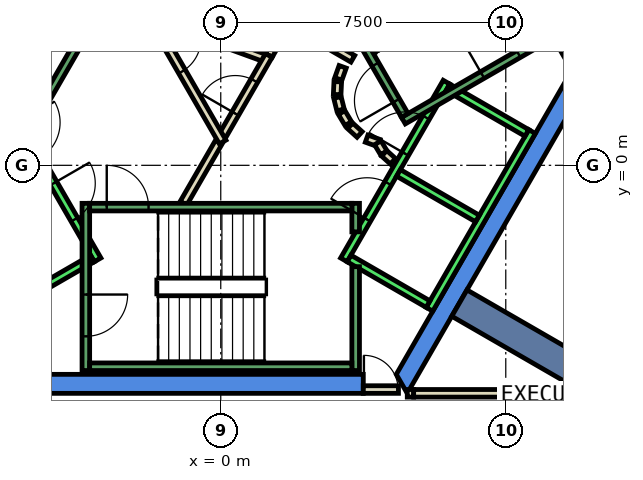
"""IFC4 building model, lengths in metres.
Left out: names, types, materials, properties, quantities, classifications, styles, units other than length and angle.
Written with IfcOpenShell. Run it as: python <this file> out.ifc"""

import sys

from ifc_helpers import new_model, si_unit, direction, frame, frame_2d, origin, place, context, subcontext, project, spatial, polyline, rectangle, outline, extrude, element, fill, save


model = new_model("IFC4")
c1 = context("Model", 3, precision=1e-05, world=origin(), true_north=direction((0.0, 1.0)))
c2 = subcontext(c1, "Body", "Model", "MODEL_VIEW")
j1 = project(units=[si_unit("LENGTHUNIT", "METRE"), si_unit("PLANEANGLEUNIT", "RADIAN")], contexts=[c1])
p1 = place(None, origin())
s1 = spatial("IfcSite", under=j1, at=p1, CompositionType="ELEMENT")
p2 = place(p1, origin())
s2 = spatial("IfcBuilding", under=s1, at=p2, CompositionType="ELEMENT")
p3 = place(p2, frame((0.0, 0.0, 286.4)))
s3 = spatial("IfcBuildingStorey", under=s2, at=p3, CompositionType="ELEMENT", Elevation=286.4)
p4 = place(p3, frame((0.0, 0.0, -0.6)))
e1 = element("IfcWall", 1, at=p4, inside=s3, PredefinedType="SHEAR", context=c2, shape_type="SweptSolid", body=[
    extrude(outline(polyline([(5.486, 9.998), (5.053, 9.748), (9.238, 2.5), (9.815, 2.5), (5.486, 9.998)])), origin(), (0.0, 0.0, 1.0), 3.86),
])
p5 = place(p3, frame((0.0, 0.0, -0.6)))
e2 = element("IfcWall", 2, at=p5, inside=s3, PredefinedType="SHEAR", context=c2, shape_type="SweptSolid", body=[
    extrude(outline(polyline([(3.75, -6.0), (3.75, -5.5), (-4.619, -5.5), (-4.907, -6.0), (3.75, -6.0)])), origin(), (0.0, 0.0, 1.0), 3.86),
])
p6 = place(p3, frame((0.0, 0.0, -0.6)))
e3 = element("IfcWall", 3, at=p6, inside=s3, PredefinedType="SHEAR", context=c2, shape_type="SweptSolid", body=[
    extrude(outline(polyline([(4.907, -6.0), (9.815, 2.5), (9.238, 2.5), (4.619, -5.5), (4.907, -6.0)])), origin(), (0.0, 0.0, 1.0), 3.86),
])
p7 = place(p3, frame((6.279, -3.625, -0.6), z_axis=(0.0, 0.0, 1.0), x_axis=(0.866017533419, -0.500013631625, 0.0)))
e4 = element("IfcWall", 4, at=p7, inside=s3, PredefinedType="SHEAR", context=c2, shape_type="SweptSolid", body=[
    extrude(rectangle(XDim=9.0, YDim=0.8, at=frame_2d((4.5, 0.0))), origin(), (0.0, 0.0, 1.0), 3.86),
])
p8 = place(p3, frame((1.264, 2.89, 0.0), z_axis=(0.0, 0.0, 1.0), x_axis=(0.500043792738, 0.866000118559, 0.0)))
e5 = element("IfcWall", 5, at=p8, inside=s3, PredefinedType="PARTITIONING", context=c2, shape_type="SweptSolid", body=[
    extrude(rectangle(XDim=1.096, YDim=0.2, at=frame_2d((0.548, 0.0))), origin(), (0.0, 0.0, 1.0), 3.26),
])
p9 = place(p3, frame((-0.888, 3.568, 0.0), z_axis=(0.0, 0.0, 1.0), x_axis=(0.939685034098, -0.34204098686, 0.0)))
e6 = element("IfcWall", 6, at=p9, inside=s3, PredefinedType="PARTITIONING", context=c2, shape_type="SweptSolid", body=[
    extrude(rectangle(XDim=2.237, YDim=0.2, at=frame_2d((1.119, 0.0))), origin(), (0.0, 0.0, 1.0), 3.26),
])
p10 = place(p3, frame((-0.982, -1.0, 0.0), z_axis=(0.0, 0.0, 1.0), x_axis=(0.50024047865, 0.865886518847, 0.0)))
e7 = element("IfcWall", 7, at=p10, inside=s3, PredefinedType="PARTITIONING", context=c2, shape_type="SweptSolid", body=[
    extrude(rectangle(XDim=1.863, YDim=0.2, at=frame_2d((0.931, 0.0))), origin(), (0.0, 0.0, 1.0), 3.26),
])
p11 = place(p3, frame((0.05, 0.787, 0.0), z_axis=(0.0, 0.0, 1.0), x_axis=(0.499945861543, 0.866056658381, 0.0)))
e8 = element("IfcWall", 8, at=p11, inside=s3, PredefinedType="PARTITIONING", context=c2, shape_type="SweptSolid", body=[
    extrude(rectangle(XDim=2.428, YDim=0.2, at=frame_2d((1.214, 0.0))), origin(), (0.0, 0.0, 1.0), 3.26),
])
p12 = place(p11, frame((0.664, 0.0, 0.0)))
e9 = element("IfcOpeningElement", 9, at=p12, cuts=e8, PredefinedType="OPENING", context=c2, shape_type="SweptSolid", body=[
    extrude(rectangle(XDim=1.0, YDim=2.1, at=frame_2d((0.5, 1.05))), frame((0.0, 0.11, 0.0), z_axis=(0.0, -1.0, 0.0), x_axis=(1.0, 0.0, 0.0)), (0.0, 0.0, 1.0), 0.22),
])
p13 = place(p3, frame((1.751, 3.798, 0.0), z_axis=(0.0, 0.0, 1.0), x_axis=(0.866091650241, -0.499885240213, 0.0)))
e10 = element("IfcWall", 10, at=p13, inside=s3, PredefinedType="PARTITIONING", context=c2, shape_type="SweptSolid", body=[
    extrude(rectangle(XDim=1.991, YDim=0.2, at=frame_2d((0.995, 0.0))), origin(), (0.0, 0.0, 1.0), 3.26),
])
p14 = place(p3, frame((3.208, 2.592, 0.0), z_axis=(0.0, 0.0, 1.0), x_axis=(-0.337388820924, -0.941365382578, 0.0)))
e11 = element("IfcWall", 11, at=p14, inside=s3, PredefinedType="PARTITIONING", context=c2, shape_type="SweptSolid", body=[
    extrude(rectangle(XDim=0.338, YDim=0.2, at=frame_2d((0.169, 0.0))), origin(), (0.0, 0.0, 1.0), 3.26),
])
p15 = place(p3, frame((3.079, 2.199, 0.0), z_axis=(0.0, 0.0, 1.0), x_axis=(-0.047771483479, -0.998858290933, 0.0)))
e12 = element("IfcWall", 12, at=p15, inside=s3, PredefinedType="PARTITIONING", context=c2, shape_type="SweptSolid", body=[
    extrude(rectangle(XDim=0.337, YDim=0.2, at=frame_2d((0.169, 0.0))), origin(), (0.0, 0.0, 1.0), 3.26),
])
p16 = place(p3, frame((3.07, 1.786, 0.0), z_axis=(0.0, 0.0, 1.0), x_axis=(0.242705583207, -0.970099994784, 0.0)))
e13 = element("IfcWall", 13, at=p16, inside=s3, PredefinedType="PARTITIONING", context=c2, shape_type="SweptSolid", body=[
    extrude(rectangle(XDim=0.338, YDim=0.2, at=frame_2d((0.169, 0.0))), origin(), (0.0, 0.0, 1.0), 3.26),
])
for number, where, z_axis, x_axis in (
    (14, (3.182, 1.388, 0.0), (0.0, 0.0, 1.0), (0.512, -0.859, 0.0)),
    (15, (3.404, 1.039, 0.0), (0.0, 0.0, 1.0), (0.74, -0.672, 0.0)),
):
    element("IfcWall", number, at=place(p3, frame(where, z_axis=z_axis, x_axis=x_axis)), inside=s3, PredefinedType="PARTITIONING", context=c2, shape_type="SweptSolid", body=[
        extrude(rectangle(XDim=0.338, YDim=0.2, at=frame_2d((0.169, 0.0))), origin(), (0.0, 0.0, 1.0), 3.26),
    ])
p17 = place(p3, frame((3.838, 0.702, 0.0), z_axis=(0.0, 0.0, 1.0), x_axis=(0.941035081519, -0.338308993895, 0.0)))
e16 = element("IfcWall", 16, at=p17, inside=s3, PredefinedType="PARTITIONING", context=c2, shape_type="SweptSolid", body=[
    extrude(rectangle(XDim=0.337, YDim=0.2, at=frame_2d((0.168, 0.0))), origin(), (0.0, 0.0, 1.0), 3.26),
])
p18 = place(p3, frame((4.132, 0.593, 0.0), z_axis=(0.0, 0.0, 1.0), x_axis=(0.513561617048, -0.858052717201, 0.0)))
e17 = element("IfcWall", 17, at=p18, inside=s3, PredefinedType="PARTITIONING", context=c2, shape_type="SweptSolid", body=[
    extrude(rectangle(XDim=0.308, YDim=0.2, at=frame_2d((0.154, 0.0))), origin(), (0.0, 0.0, 1.0), 3.26),
])
p19 = place(p3, frame((4.301, 0.315, 0.0), z_axis=(0.0, 0.0, 1.0), x_axis=(0.741798017506, -0.670623367639, 0.0)))
e18 = element("IfcWall", 18, at=p19, inside=s3, PredefinedType="PARTITIONING", context=c2, shape_type="SweptSolid", body=[
    extrude(rectangle(XDim=0.309, YDim=0.2, at=frame_2d((0.154, 0.0))), origin(), (0.0, 0.0, 1.0), 3.26),
])
p20 = place(p3, frame((-2.54, 5.1, 0.0), z_axis=(0.0, 0.0, 1.0), x_axis=(0.499925051871, -0.866068670783, 0.0)))
e19 = element("IfcWall", 19, at=p20, inside=s3, PredefinedType="PARTITIONING", context=c2, shape_type="SweptSolid", body=[
    extrude(rectangle(XDim=5.181, YDim=0.2, at=frame_2d((2.59, 0.0))), origin(), (0.0, 0.0, 1.0), 3.26),
])
p21 = place(p20, frame((2.04, 0.0, 0.0)))
e20 = element("IfcOpeningElement", 20, at=p21, cuts=e19, PredefinedType="OPENING", context=c2, shape_type="SweptSolid", body=[
    extrude(rectangle(XDim=1.0, YDim=2.1, at=frame_2d((0.5, 1.05))), frame((0.0, 0.11, 0.0), z_axis=(0.0, -1.0, 0.0), x_axis=(1.0, 0.0, 0.0)), (0.0, 0.0, 1.0), 0.22),
])
p22 = place(p3, frame((4.908, -5.999, 0.0), z_axis=(0.0, 0.0, 1.0), x_axis=(1.0, 0.0, 0.0)))
e21 = element("IfcWall", 21, at=p22, inside=s3, PredefinedType="PARTITIONING", context=c2, shape_type="SweptSolid", body=[
    extrude(rectangle(XDim=0.168, YDim=0.2, at=frame_2d((0.084, 0.0))), origin(), (0.0, 0.0, 1.0), 2.4),
])
p23 = place(p3, frame((7.8, -5.899, 0.0), z_axis=(0.0, 0.0, 1.0), x_axis=(0.0, -1.0, 0.0)))
e22 = element("IfcWall", 22, at=p23, inside=s3, PredefinedType="PARTITIONING", context=c2, shape_type="SweptSolid", body=[
    extrude(rectangle(XDim=3.876, YDim=0.2, at=frame_2d((1.938, 0.0))), origin(), (0.0, 0.0, 1.0), 3.26),
])
p24 = place(p3, frame((3.75, -5.9, 0.0), z_axis=(0.0, 0.0, 1.0), x_axis=(1.0, 0.0, 0.0)))
e23 = element("IfcWall", 23, at=p24, inside=s3, PredefinedType="PARTITIONING", context=c2, shape_type="SweptSolid", body=[
    extrude(rectangle(XDim=0.926, YDim=0.2, at=frame_2d((0.463, 0.0))), origin(), (0.0, 0.0, 1.0), 2.4),
])
p25 = place(p24, frame((0.017, 0.0, 0.0)))
e24 = element("IfcOpeningElement", 24, at=p25, cuts=e23, PredefinedType="OPENING", context=c2, shape_type="SweptSolid", body=[
    extrude(rectangle(XDim=0.9, YDim=2.1, at=frame_2d((0.45, 1.05))), frame((0.0, 0.11, 0.0), z_axis=(0.0, -1.0, 0.0), x_axis=(1.0, 0.0, 0.0)), (0.0, 0.0, 1.0), 0.22),
])
p26 = place(p3, frame((5.076, -5.999, 0.0), z_axis=(0.0, 0.0, 1.0), x_axis=(1.0, 0.0, 0.0)))
e25 = element("IfcWall", 25, at=p26, inside=s3, PredefinedType="PARTITIONING", context=c2, shape_type="SweptSolid", body=[
    extrude(rectangle(XDim=2.624, YDim=0.2, at=frame_2d((1.312, 0.0))), origin(), (0.0, 0.0, 1.0), 3.26),
])
p27 = place(p3, frame((-5.94, 2.188, 0.0), z_axis=(0.0, 0.0, 1.0), x_axis=(0.500034260056, -0.866005622828, 0.0)))
e26 = element("IfcWall", 26, at=p27, inside=s3, PredefinedType="STANDARD", context=c2, shape_type="SweptSolid", body=[
    extrude(rectangle(XDim=5.399, YDim=0.2, at=frame_2d((2.7, 0.0))), origin(), (0.0, 0.0, 1.0), 3.26),
])
p28 = place(p27, frame((3.075, 0.0, 0.0)))
e27 = element("IfcOpeningElement", 27, at=p28, cuts=e26, PredefinedType="OPENING", context=c2, shape_type="SweptSolid", body=[
    extrude(rectangle(XDim=1.1, YDim=2.1, at=frame_2d((0.55, 1.05))), frame((0.0, 0.11, 0.0), z_axis=(0.0, -1.0, 0.0), x_axis=(1.0, 0.0, 0.0)), (0.0, 0.0, 1.0), 0.22),
])
p29 = place(p27, frame((1.225, 0.0, 0.0)))
e28 = element("IfcOpeningElement", 28, at=p29, cuts=e26, PredefinedType="OPENING", context=c2, shape_type="SweptSolid", body=[
    extrude(rectangle(XDim=1.1, YDim=2.1, at=frame_2d((0.55, 1.05))), frame((0.0, 0.11, 0.0), z_axis=(0.0, -1.0, 0.0), x_axis=(1.0, 0.0, 0.0)), (0.0, 0.0, 1.0), 0.22),
])
p30 = place(p3, frame((-3.377, -2.452, 0.0), z_axis=(0.0, 0.0, 1.0), x_axis=(-0.865955154139, -0.50012165622, 0.0)))
e29 = element("IfcWall", 29, at=p30, inside=s3, PredefinedType="STANDARD", context=c2, shape_type="SweptSolid", body=[
    extrude(rectangle(XDim=2.4, YDim=0.2, at=frame_2d((1.2, 0.0))), origin(), (0.0, 0.0, 1.0), 3.26),
])
p31 = place(p3, frame((3.24, -2.488, 0.0), z_axis=(0.0, 0.0, 1.0), x_axis=(0.500034260056, 0.866005622828, 0.0)))
e30 = element("IfcWall", 30, at=p31, inside=s3, PredefinedType="STANDARD", context=c2, shape_type="SweptSolid", body=[
    extrude(rectangle(XDim=5.399, YDim=0.2, at=frame_2d((2.7, 0.0))), origin(), (0.0, 0.0, 1.0), 3.26),
])
p32 = place(p31, frame((3.225, 0.0, 0.0)))
e31 = element("IfcOpeningElement", 31, at=p32, cuts=e30, PredefinedType="OPENING", context=c2, shape_type="SweptSolid", body=[
    extrude(rectangle(XDim=1.1, YDim=2.1, at=frame_2d((0.55, 1.05))), frame((0.0, 0.11, 0.0), z_axis=(0.0, -1.0, 0.0), x_axis=(1.0, 0.0, 0.0)), (0.0, 0.0, 1.0), 0.22),
])
p33 = place(p31, frame((1.225, 0.0, 0.0)))
e32 = element("IfcOpeningElement", 32, at=p33, cuts=e30, PredefinedType="OPENING", context=c2, shape_type="SweptSolid", body=[
    extrude(rectangle(XDim=1.1, YDim=2.1, at=frame_2d((0.55, 1.05))), frame((0.0, 0.11, 0.0), z_axis=(0.0, -1.0, 0.0), x_axis=(1.0, 0.0, 0.0)), (0.0, 0.0, 1.0), 0.22),
])
p34 = place(p3, frame((5.492, -3.788, 0.0), z_axis=(0.0, 0.0, 1.0), x_axis=(0.500034260056, 0.866005622828, 0.0)))
e33 = element("IfcWall", 33, at=p34, inside=s3, PredefinedType="STANDARD", context=c2, shape_type="SweptSolid", body=[
    extrude(rectangle(XDim=5.399, YDim=0.2, at=frame_2d((2.7, 0.0))), origin(), (0.0, 0.0, 1.0), 3.26),
])
p35 = place(p3, frame((3.377, -2.452, 0.0), z_axis=(0.0, 0.0, 1.0), x_axis=(0.865955154139, -0.50012165622, 0.0)))
e34 = element("IfcWall", 34, at=p35, inside=s3, PredefinedType="STANDARD", context=c2, shape_type="SweptSolid", body=[
    extrude(rectangle(XDim=2.4, YDim=0.2, at=frame_2d((1.2, 0.0))), origin(), (0.0, 0.0, 1.0), 3.26),
])
for number, where, z_axis, x_axis in (
    (35, (4.677, -0.2, 0.0), (0.0, 0.0, 1.0), (0.866, -0.5, 0.0)),
    (36, (5.977, 2.052, 0.0), (0.0, 0.0, 1.0), (0.866, -0.5, 0.0)),
):
    element("IfcWall", number, at=place(p3, frame(where, z_axis=z_axis, x_axis=x_axis)), inside=s3, PredefinedType="STANDARD", context=c2, shape_type="SweptSolid", body=[
        extrude(rectangle(XDim=2.399, YDim=0.2, at=frame_2d((1.2, 0.0))), origin(), (0.0, 0.0, 1.0), 3.26),
    ])
p36 = place(p3, frame((-3.55, -1.0, 0.0), z_axis=(0.0, 0.0, 1.0), x_axis=(0.0, -1.0, 0.0)))
e37 = element("IfcWall", 37, at=p36, inside=s3, PredefinedType="STANDARD", context=c2, shape_type="SweptSolid", body=[
    extrude(rectangle(XDim=4.4, YDim=0.2, at=frame_2d((2.2, 0.0))), origin(), (0.0, 0.0, 1.0), 3.26),
])
p37 = place(p36, frame((2.4, 0.0, 0.0)))
e38 = element("IfcOpeningElement", 38, at=p37, cuts=e37, PredefinedType="OPENING", context=c2, shape_type="SweptSolid", body=[
    extrude(rectangle(XDim=1.1, YDim=2.2, at=frame_2d((0.55, 1.1))), frame((0.0, 0.11, 0.0), z_axis=(0.0, -1.0, 0.0), x_axis=(1.0, 0.0, 0.0)), (0.0, 0.0, 1.0), 0.22),
])
p38 = place(p3, frame((3.55, -2.667, 0.0), z_axis=(0.0, 0.0, 1.0), x_axis=(0.0, -1.0, 0.0)))
e39 = element("IfcWall", 39, at=p38, inside=s3, PredefinedType="STANDARD", context=c2, shape_type="SweptSolid", body=[
    extrude(rectangle(XDim=2.733, YDim=0.2, at=frame_2d((1.366, 0.0))), origin(), (0.0, 0.0, 1.0), 3.26),
])
p39 = place(p3, frame((3.55, -1.0, 0.0), z_axis=(0.0, 0.0, 1.0), x_axis=(0.0, -1.0, 0.0)))
e40 = element("IfcWall", 40, at=p39, inside=s3, PredefinedType="STANDARD", context=c2, shape_type="SweptSolid", body=[
    extrude(rectangle(XDim=0.751, YDim=0.2, at=frame_2d((0.375, 0.0))), origin(), (0.0, 0.0, 1.0), 3.26),
])
p40 = place(p3, frame((-3.45, -1.1, 0.0), z_axis=(0.0, 0.0, 1.0), x_axis=(1.0, 0.0, 0.0)))
e41 = element("IfcWall", 41, at=p40, inside=s3, PredefinedType="STANDARD", context=c2, shape_type="SweptSolid", body=[
    extrude(rectangle(XDim=6.9, YDim=0.2, at=frame_2d((3.45, 0.0))), origin(), (0.0, 0.0, 1.0), 3.26),
])
p41 = place(p40, frame((0.45, 0.0, 0.0)))
e42 = element("IfcOpeningElement", 42, at=p41, cuts=e41, PredefinedType="OPENING", context=c2, shape_type="SweptSolid", body=[
    extrude(rectangle(XDim=1.1, YDim=2.2, at=frame_2d((0.55, 1.1))), frame((0.0, 0.11, 0.0), z_axis=(0.0, -1.0, 0.0), x_axis=(1.0, 0.0, 0.0)), (0.0, 0.0, 1.0), 0.22),
])
p42 = place(p3, frame((-3.45, -5.3, 0.0), z_axis=(0.0, 0.0, 1.0), x_axis=(1.0, 0.0, 0.0)))
e43 = element("IfcWall", 43, at=p42, inside=s3, PredefinedType="STANDARD", context=c2, shape_type="SweptSolid", body=[
    extrude(rectangle(XDim=6.9, YDim=0.2, at=frame_2d((3.45, 0.0))), origin(), (0.0, 0.0, 1.0), 3.26),
])
p43 = place(p3, frame((4.806, 1.176, 0.0), z_axis=(0.0, 0.0, 1.0), x_axis=(0.866059941101, 0.499940174841, 0.0)))
e44 = element("IfcWall", 44, at=p43, inside=s3, PredefinedType="STANDARD", context=c2, shape_type="SweptSolid", body=[
    extrude(rectangle(XDim=4.4, YDim=0.2, at=frame_2d((2.2, 0.0))), origin(), (0.0, 0.0, 1.0), 3.26),
])
p44 = place(p43, frame((2.4, 0.0, 0.0)))
e45 = element("IfcOpeningElement", 45, at=p44, cuts=e44, PredefinedType="OPENING", context=c2, shape_type="SweptSolid", body=[
    extrude(rectangle(XDim=1.1, YDim=2.2, at=frame_2d((0.55, 1.1))), frame((0.0, 0.11, 0.0), z_axis=(0.0, -1.0, 0.0), x_axis=(1.0, 0.0, 0.0)), (0.0, 0.0, 1.0), 0.22),
])
p45 = place(p3, frame((4.843, 1.312, 0.0), z_axis=(0.0, 0.0, 1.0), x_axis=(-0.499963383562, 0.866046543262, 0.0)))
e46 = element("IfcWall", 46, at=p45, inside=s3, PredefinedType="STANDARD", context=c2, shape_type="SweptSolid", body=[
    extrude(rectangle(XDim=6.9, YDim=0.2, at=frame_2d((3.45, 0.0))), origin(), (0.0, 0.0, 1.0), 3.26),
])
p46 = place(p45, frame((0.45, 0.0, 0.0)))
e47 = element("IfcOpeningElement", 47, at=p46, cuts=e46, PredefinedType="OPENING", context=c2, shape_type="SweptSolid", body=[
    extrude(rectangle(XDim=1.1, YDim=2.2, at=frame_2d((0.55, 1.1))), frame((0.0, 0.11, 0.0), z_axis=(0.0, -1.0, 0.0), x_axis=(1.0, 0.0, 0.0)), (0.0, 0.0, 1.0), 0.22),
])
p47 = place(p3, frame((-1.393, 7.288, 0.0), z_axis=(0.0, 0.0, 1.0), x_axis=(-0.499963383562, -0.866046543262, 0.0)))
e48 = element("IfcWall", 48, at=p47, inside=s3, PredefinedType="STANDARD", context=c2, shape_type="SweptSolid", body=[
    extrude(rectangle(XDim=6.9, YDim=0.2, at=frame_2d((3.45, 0.0))), origin(), (0.0, 0.0, 1.0), 3.26),
])
p48 = place(p47, frame((0.45, 0.0, 0.0)))
e49 = element("IfcOpeningElement", 49, at=p48, cuts=e48, PredefinedType="OPENING", context=c2, shape_type="SweptSolid", body=[
    extrude(rectangle(XDim=1.1, YDim=2.2, at=frame_2d((0.55, 1.1))), frame((0.0, 0.11, 0.0), z_axis=(0.0, -1.0, 0.0), x_axis=(1.0, 0.0, 0.0)), (0.0, 0.0, 1.0), 0.22),
])
p49 = place(p12, origin())
e50 = element("IfcDoor", 50, at=p49, inside=s3, OperationType="SINGLE_SWING_RIGHT", PredefinedType="DOOR", context=c2, shape_type="SweptSolid", body=[
    extrude(rectangle(XDim=1.0, YDim=2.1, at=frame_2d((0.5, 1.05))), frame((0.0, 0.025, 0.0), z_axis=(0.0, -1.0, 0.0), x_axis=(1.0, 0.0, 0.0)), (0.0, 0.0, 1.0), 0.05),
])
fill(e9, e50)
p50 = place(p21, origin())
e51 = element("IfcDoor", 51, at=p50, inside=s3, OperationType="SINGLE_SWING_RIGHT", PredefinedType="DOOR", context=c2, shape_type="SweptSolid", body=[
    extrude(rectangle(XDim=1.0, YDim=2.1, at=frame_2d((0.5, 1.05))), frame((0.0, 0.025, 0.0), z_axis=(0.0, -1.0, 0.0), x_axis=(1.0, 0.0, 0.0)), (0.0, 0.0, 1.0), 0.05),
])
fill(e20, e51)
p51 = place(p25, origin())
e52 = element("IfcDoor", 52, at=p51, inside=s3, OperationType="SINGLE_SWING_LEFT", PredefinedType="DOOR", context=c2, shape_type="SweptSolid", body=[
    extrude(rectangle(XDim=0.9, YDim=2.1, at=frame_2d((0.45, 1.05))), frame((0.0, 0.025, 0.0), z_axis=(0.0, -1.0, 0.0), x_axis=(1.0, 0.0, 0.0)), (0.0, 0.0, 1.0), 0.05),
])
fill(e24, e52)
p52 = place(p32, origin())
e53 = element("IfcDoor", 53, at=p52, inside=s3, OperationType="SLIDING_TO_LEFT", PredefinedType="DOOR", context=c2, shape_type="SweptSolid", body=[
    extrude(rectangle(XDim=1.1, YDim=2.1, at=frame_2d((0.55, 1.05))), frame((0.0, 0.025, 0.0), z_axis=(0.0, -1.0, 0.0), x_axis=(1.0, 0.0, 0.0)), (0.0, 0.0, 1.0), 0.05),
])
fill(e31, e53)
p53 = place(p28, origin())
e54 = element("IfcDoor", 54, at=p53, inside=s3, OperationType="SLIDING_TO_LEFT", PredefinedType="DOOR", context=c2, shape_type="SweptSolid", body=[
    extrude(rectangle(XDim=1.1, YDim=2.1, at=frame_2d((0.55, 1.05))), frame((0.0, 0.025, 0.0), z_axis=(0.0, -1.0, 0.0), x_axis=(1.0, 0.0, 0.0)), (0.0, 0.0, 1.0), 0.05),
])
fill(e27, e54)
p54 = place(p33, origin())
e55 = element("IfcDoor", 55, at=p54, inside=s3, OperationType="SLIDING_TO_LEFT", PredefinedType="DOOR", context=c2, shape_type="SweptSolid", body=[
    extrude(rectangle(XDim=1.1, YDim=2.1, at=frame_2d((0.55, 1.05))), frame((0.0, 0.025, 0.0), z_axis=(0.0, -1.0, 0.0), x_axis=(1.0, 0.0, 0.0)), (0.0, 0.0, 1.0), 0.05),
])
fill(e32, e55)
p55 = place(p41, origin())
e56 = element("IfcDoor", 56, at=p55, inside=s3, OperationType="SINGLE_SWING_LEFT", PredefinedType="DOOR", context=c2, shape_type="SweptSolid", body=[
    extrude(rectangle(XDim=1.1, YDim=2.2, at=frame_2d((0.55, 1.1))), frame((0.0, 0.025, 0.0), z_axis=(0.0, -1.0, 0.0), x_axis=(1.0, 0.0, 0.0)), (0.0, 0.0, 1.0), 0.05),
])
fill(e42, e56)
p56 = place(p37, origin())
e57 = element("IfcDoor", 57, at=p56, inside=s3, OperationType="SINGLE_SWING_LEFT", PredefinedType="DOOR", context=c2, shape_type="SweptSolid", body=[
    extrude(rectangle(XDim=1.1, YDim=2.2, at=frame_2d((0.55, 1.1))), frame((0.0, 0.025, 0.0), z_axis=(0.0, -1.0, 0.0), x_axis=(1.0, 0.0, 0.0)), (0.0, 0.0, 1.0), 0.05),
])
fill(e38, e57)
p57 = place(p46, origin())
e58 = element("IfcDoor", 58, at=p57, inside=s3, OperationType="SINGLE_SWING_LEFT", PredefinedType="DOOR", context=c2, shape_type="SweptSolid", body=[
    extrude(rectangle(XDim=1.1, YDim=2.2, at=frame_2d((0.55, 1.1))), frame((0.0, 0.025, 0.0), z_axis=(0.0, -1.0, 0.0), x_axis=(1.0, 0.0, 0.0)), (0.0, 0.0, 1.0), 0.05),
])
fill(e47, e58)
p58 = place(p44, origin())
e59 = element("IfcDoor", 59, at=p58, inside=s3, OperationType="SINGLE_SWING_LEFT", PredefinedType="DOOR", context=c2, shape_type="SweptSolid", body=[
    extrude(rectangle(XDim=1.1, YDim=2.2, at=frame_2d((0.55, 1.1))), frame((0.0, 0.025, 0.0), z_axis=(0.0, -1.0, 0.0), x_axis=(1.0, 0.0, 0.0)), (0.0, 0.0, 1.0), 0.05),
])
fill(e45, e59)
save(model, sys.argv[1])
